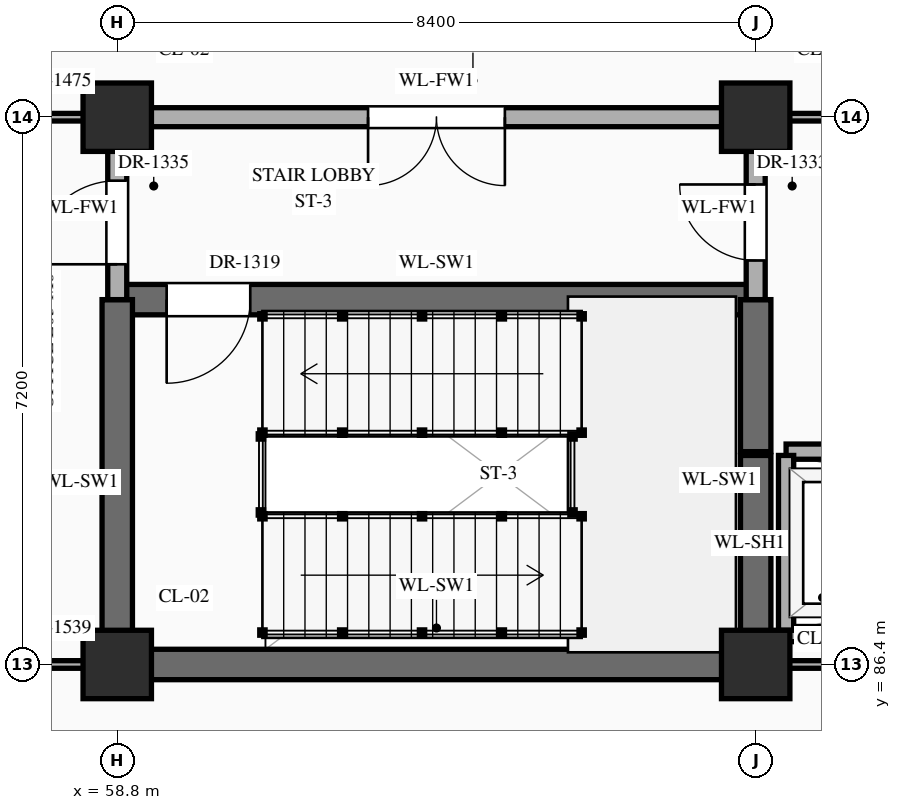
"""IFC4 building model, lengths in metres.
Left out: names, types, materials, properties, quantities, classifications, styles, units other than length and angle.
Written with IfcOpenShell. Run it as: python <this file> out.ifc"""

import sys

from ifc_helpers import new_model, si_unit, direction, frame, frame_2d, origin, origin_2d, place, context, subcontext, project, spatial, rectangle, extrude, element, fill, save


model = new_model("IFC4")
c1 = context("Model", 3, precision=1e-05, world=origin(), true_north=direction((0.0, 1.0)))
c2 = subcontext(c1, "Body", "Model", "MODEL_VIEW")
j1 = project(units=[si_unit("LENGTHUNIT", "METRE"), si_unit("PLANEANGLEUNIT", "RADIAN")], contexts=[c1])
p1 = place(None, origin())
s1 = spatial("IfcSite", under=j1, at=p1, CompositionType="ELEMENT")
p2 = place(p1, origin())
s2 = spatial("IfcBuilding", under=s1, at=p2, CompositionType="ELEMENT")
p3 = place(p2, frame((0.0, 0.0, 10.8)))
s3 = spatial("IfcBuildingStorey", under=s2, at=p3, CompositionType="ELEMENT", Elevation=10.8)
for number, where, z_axis, x_axis in (
    (1, (58.8, 86.4, 0.0), (0.0, 0.0, 1.0), (1.0, 0.0, 0.0)),
    (2, (58.8, 93.6, 0.0), (0.0, 0.0, 1.0), (1.0, 0.0, 0.0)),
    (3, (67.2, 86.4, 0.0), (0.0, 0.0, 1.0), (1.0, 0.0, 0.0)),
    (4, (67.2, 93.6, 0.0), (0.0, 0.0, 1.0), (1.0, 0.0, 0.0)),
):
    element("IfcColumn", number, at=place(p3, frame(where, z_axis=z_axis, x_axis=x_axis)), inside=s3, PredefinedType="COLUMN", context=c2, shape_type="SweptSolid", body=[
        extrude(rectangle(XDim=0.9, YDim=0.9, at=origin_2d()), origin(), (0.0, 0.0, 1.0), 5.4),
    ])
p4 = place(p3, frame((50.4, 86.4, 0.0), z_axis=(0.0, 0.0, 1.0), x_axis=(1.0, 0.0, 0.0)))
e5 = element("IfcWall", 5, at=p4, inside=s3, PredefinedType="STANDARD", context=c2, shape_type="SweptSolid", body=[
    extrude(rectangle(XDim=8.4, YDim=0.1, at=frame_2d((4.2, 0.0))), origin(), (0.0, 0.0, 1.0), 4.27),
])
p5 = place(p4, frame((0.985, 0.0, 0.0)))
e6 = element("IfcOpeningElement", 6, at=p5, cuts=e5, PredefinedType="OPENING", context=c2, shape_type="SweptSolid", body=[
    extrude(rectangle(XDim=1.2, YDim=2.35, at=frame_2d((0.6, 1.175))), frame((0.0, 0.062, 0.0), z_axis=(0.0, -1.0, 0.0), x_axis=(1.0, 0.0, 0.0)), (0.0, 0.0, 1.0), 0.124),
])
p6 = place(p4, frame((3.56, 0.0, 0.0)))
e7 = element("IfcOpeningElement", 7, at=p6, cuts=e5, PredefinedType="OPENING", context=c2, shape_type="SweptSolid", body=[
    extrude(rectangle(XDim=1.28, YDim=2.35, at=frame_2d((0.64, 1.175))), frame((0.0, 0.062, 0.0), z_axis=(0.0, -1.0, 0.0), x_axis=(1.0, 0.0, 0.0)), (0.0, 0.0, 1.0), 0.124),
])
p7 = place(p4, frame((6.345, 0.0, 0.0)))
e8 = element("IfcOpeningElement", 8, at=p7, cuts=e5, PredefinedType="OPENING", context=c2, shape_type="SweptSolid", body=[
    extrude(rectangle(XDim=0.94, YDim=2.3, at=frame_2d((0.47, 1.15))), frame((0.0, 0.062, 0.0), z_axis=(0.0, -1.0, 0.0), x_axis=(1.0, 0.0, 0.0)), (0.0, 0.0, 1.0), 0.124),
])
p8 = place(p3, frame((58.8, 86.4, 0.0), z_axis=(0.0, 0.0, 1.0), x_axis=(1.0, 0.0, 0.0)))
e9 = element("IfcWall", 9, at=p8, inside=s3, PredefinedType="SHEAR", context=c2, shape_type="SweptSolid", body=[
    extrude(rectangle(XDim=8.4, YDim=0.4, at=frame_2d((4.2, 0.0))), origin(), (0.0, 0.0, 1.0), 5.12),
])
p9 = place(p3, frame((67.25, 86.4, 0.0), z_axis=(0.0, 0.0, 1.0), x_axis=(1.0, 0.0, 0.0)))
e10 = element("IfcWall", 10, at=p9, inside=s3, PredefinedType="STANDARD", context=c2, shape_type="SweptSolid", body=[
    extrude(rectangle(XDim=8.3, YDim=0.1, at=frame_2d((4.15, 0.0))), origin(), (0.0, 0.0, 1.0), 4.27),
])
p10 = place(p3, frame((67.6, 86.8, 0.0), z_axis=(0.0, 0.0, 1.0), x_axis=(1.0, 0.0, 0.0)))
e11 = element("IfcWall", 11, at=p10, inside=s3, PredefinedType="STANDARD", context=c2, shape_type="SweptSolid", body=[
    extrude(rectangle(XDim=2.5, YDim=0.2, at=frame_2d((1.25, 0.0))), origin(), (0.0, 0.0, 1.0), 5.12),
])
p11 = place(p3, frame((67.6, 89.2, 0.0), z_axis=(0.0, 0.0, 1.0), x_axis=(1.0, 0.0, 0.0)))
e12 = element("IfcWall", 12, at=p11, inside=s3, PredefinedType="STANDARD", context=c2, shape_type="SweptSolid", body=[
    extrude(rectangle(XDim=7.7, YDim=0.2, at=frame_2d((3.85, 0.0))), origin(), (0.0, 0.0, 1.0), 5.12),
])
p12 = place(p11, frame((0.725, 0.0, 0.0)))
e13 = element("IfcOpeningElement", 13, at=p12, cuts=e12, PredefinedType="OPENING", context=c2, shape_type="SweptSolid", body=[
    extrude(rectangle(XDim=1.1, YDim=2.15, at=frame_2d((0.55, 1.075))), frame((0.0, 0.112, 0.0), z_axis=(0.0, -1.0, 0.0), x_axis=(1.0, 0.0, 0.0)), (0.0, 0.0, 1.0), 0.224),
])
p13 = place(p11, frame((3.3, 0.0, 0.0)))
e14 = element("IfcOpeningElement", 14, at=p13, cuts=e12, PredefinedType="OPENING", context=c2, shape_type="SweptSolid", body=[
    extrude(rectangle(XDim=1.1, YDim=2.15, at=frame_2d((0.55, 1.075))), frame((0.0, 0.112, 0.0), z_axis=(0.0, -1.0, 0.0), x_axis=(1.0, 0.0, 0.0)), (0.0, 0.0, 1.0), 0.224),
])
p14 = place(p11, frame((5.875, 0.0, 0.0)))
e15 = element("IfcOpeningElement", 15, at=p14, cuts=e12, PredefinedType="OPENING", context=c2, shape_type="SweptSolid", body=[
    extrude(rectangle(XDim=1.1, YDim=2.15, at=frame_2d((0.55, 1.075))), frame((0.0, 0.112, 0.0), z_axis=(0.0, -1.0, 0.0), x_axis=(1.0, 0.0, 0.0)), (0.0, 0.0, 1.0), 0.224),
])
p15 = place(p3, frame((58.8, 91.2, 0.0), z_axis=(0.0, 0.0, 1.0), x_axis=(1.0, 0.0, 0.0)))
e16 = element("IfcWall", 16, at=p15, inside=s3, PredefinedType="SHEAR", context=c2, shape_type="SweptSolid", body=[
    extrude(rectangle(XDim=8.4, YDim=0.4, at=frame_2d((4.2, 0.0))), origin(), (0.0, 0.0, 1.0), 5.12),
])
p16 = place(p15, frame((0.65, 0.0, 0.0)))
e17 = element("IfcOpeningElement", 17, at=p16, cuts=e16, PredefinedType="OPENING", context=c2, shape_type="SweptSolid", body=[
    extrude(rectangle(XDim=1.1, YDim=2.2, at=frame_2d((0.55, 1.1))), frame((0.0, 0.212, 0.0), z_axis=(0.0, -1.0, 0.0), x_axis=(1.0, 0.0, 0.0)), (0.0, 0.0, 1.0), 0.424),
])
p17 = place(p3, frame((50.4, 93.6, 0.0), z_axis=(0.0, 0.0, 1.0), x_axis=(1.0, 0.0, 0.0)))
e18 = element("IfcWall", 18, at=p17, inside=s3, PredefinedType="STANDARD", context=c2, shape_type="SweptSolid", body=[
    extrude(rectangle(XDim=8.4, YDim=0.1, at=frame_2d((4.2, 0.0))), origin(), (0.0, 0.0, 1.0), 4.27),
])
p18 = place(p17, frame((1.075, 0.0, 0.0)))
e19 = element("IfcOpeningElement", 19, at=p18, cuts=e18, PredefinedType="OPENING", context=c2, shape_type="SweptSolid", body=[
    extrude(rectangle(XDim=1.02, YDim=2.4, at=frame_2d((0.51, 1.2))), frame((0.0, 0.062, 0.0), z_axis=(0.0, -1.0, 0.0), x_axis=(1.0, 0.0, 0.0)), (0.0, 0.0, 1.0), 0.124),
])
p19 = place(p17, frame((3.67, 0.0, 0.0)))
e20 = element("IfcOpeningElement", 20, at=p19, cuts=e18, PredefinedType="OPENING", context=c2, shape_type="SweptSolid", body=[
    extrude(rectangle(XDim=1.06, YDim=2.4, at=frame_2d((0.53, 1.2))), frame((0.0, 0.062, 0.0), z_axis=(0.0, -1.0, 0.0), x_axis=(1.0, 0.0, 0.0)), (0.0, 0.0, 1.0), 0.124),
])
p20 = place(p17, frame((6.245, 0.0, 0.0)))
e21 = element("IfcOpeningElement", 21, at=p20, cuts=e18, PredefinedType="OPENING", context=c2, shape_type="SweptSolid", body=[
    extrude(rectangle(XDim=1.14, YDim=2.4, at=frame_2d((0.57, 1.2))), frame((0.0, 0.062, 0.0), z_axis=(0.0, -1.0, 0.0), x_axis=(1.0, 0.0, 0.0)), (0.0, 0.0, 1.0), 0.124),
])
p21 = place(p3, frame((58.8, 93.6, 0.0), z_axis=(0.0, 0.0, 1.0), x_axis=(1.0, 0.0, 0.0)))
e22 = element("IfcWall", 22, at=p21, inside=s3, PredefinedType="STANDARD", context=c2, shape_type="SweptSolid", body=[
    extrude(rectangle(XDim=8.4, YDim=0.25, at=frame_2d((4.2, 0.0))), origin(), (0.0, 0.0, 1.0), 4.27),
])
p22 = place(p21, frame((3.3, 0.0, 0.0)))
e23 = element("IfcOpeningElement", 23, at=p22, cuts=e22, PredefinedType="OPENING", context=c2, shape_type="SweptSolid", body=[
    extrude(rectangle(XDim=1.8, YDim=2.35, at=frame_2d((0.9, 1.175))), frame((0.0, 0.137, 0.0), z_axis=(0.0, -1.0, 0.0), x_axis=(1.0, 0.0, 0.0)), (0.0, 0.0, 1.0), 0.274),
])
p23 = place(p3, frame((67.2, 93.6, 0.0), z_axis=(0.0, 0.0, 1.0), x_axis=(1.0, 0.0, 0.0)))
e24 = element("IfcWall", 24, at=p23, inside=s3, PredefinedType="STANDARD", context=c2, shape_type="SweptSolid", body=[
    extrude(rectangle(XDim=33.6, YDim=0.1, at=frame_2d((16.8, 0.0))), origin(), (0.0, 0.0, 1.0), 4.27),
])
p24 = place(p23, frame((3.475, 0.0, 0.0)))
e25 = element("IfcOpeningElement", 25, at=p24, cuts=e24, PredefinedType="OPENING", context=c2, shape_type="SweptSolid", body=[
    extrude(rectangle(XDim=1.45, YDim=2.3, at=frame_2d((0.725, 1.15))), frame((0.0, 0.062, 0.0), z_axis=(0.0, -1.0, 0.0), x_axis=(1.0, 0.0, 0.0)), (0.0, 0.0, 1.0), 0.124),
])
p25 = place(p23, frame((28.45, 0.0, 0.0)))
e26 = element("IfcOpeningElement", 26, at=p25, cuts=e24, PredefinedType="OPENING", context=c2, shape_type="SweptSolid", body=[
    extrude(rectangle(XDim=1.9, YDim=2.5, at=frame_2d((0.95, 1.25))), frame((0.0, 0.062, 0.0), z_axis=(0.0, -1.0, 0.0), x_axis=(1.0, 0.0, 0.0)), (0.0, 0.0, 1.0), 0.124),
])
p26 = place(p23, frame((11.825, 0.0, 0.0)))
e27 = element("IfcOpeningElement", 27, at=p26, cuts=e24, PredefinedType="OPENING", context=c2, shape_type="SweptSolid", body=[
    extrude(rectangle(XDim=1.55, YDim=2.35, at=frame_2d((0.775, 1.175))), frame((0.0, 0.062, 0.0), z_axis=(0.0, -1.0, 0.0), x_axis=(1.0, 0.0, 0.0)), (0.0, 0.0, 1.0), 0.124),
])
p27 = place(p23, frame((17.785, 0.0, 0.0)))
e28 = element("IfcOpeningElement", 28, at=p27, cuts=e24, PredefinedType="OPENING", context=c2, shape_type="SweptSolid", body=[
    extrude(rectangle(XDim=1.2, YDim=2.35, at=frame_2d((0.6, 1.175))), frame((0.0, 0.062, 0.0), z_axis=(0.0, -1.0, 0.0), x_axis=(1.0, 0.0, 0.0)), (0.0, 0.0, 1.0), 0.124),
])
p28 = place(p23, frame((20.38, 0.0, 0.0)))
e29 = element("IfcOpeningElement", 29, at=p28, cuts=e24, PredefinedType="OPENING", context=c2, shape_type="SweptSolid", body=[
    extrude(rectangle(XDim=1.24, YDim=2.3, at=frame_2d((0.62, 1.15))), frame((0.0, 0.062, 0.0), z_axis=(0.0, -1.0, 0.0), x_axis=(1.0, 0.0, 0.0)), (0.0, 0.0, 1.0), 0.124),
])
p29 = place(p23, frame((22.975, 0.0, 0.0)))
e30 = element("IfcOpeningElement", 30, at=p29, cuts=e24, PredefinedType="OPENING", context=c2, shape_type="SweptSolid", body=[
    extrude(rectangle(XDim=1.28, YDim=2.35, at=frame_2d((0.64, 1.175))), frame((0.0, 0.062, 0.0), z_axis=(0.0, -1.0, 0.0), x_axis=(1.0, 0.0, 0.0)), (0.0, 0.0, 1.0), 0.124),
])
p30 = place(p3, frame((58.8, 86.4, 0.0), z_axis=(0.0, 0.0, 1.0), x_axis=(0.0, 1.0, 0.0)))
e31 = element("IfcWall", 31, at=p30, inside=s3, PredefinedType="SHEAR", context=c2, shape_type="SweptSolid", body=[
    extrude(rectangle(XDim=4.8, YDim=0.4, at=frame_2d((2.4, 0.0))), origin(), (0.0, 0.0, 1.0), 5.12),
])
p31 = place(p3, frame((58.8, 91.2, 0.0), z_axis=(0.0, 0.0, 1.0), x_axis=(0.0, 1.0, 0.0)))
e32 = element("IfcWall", 32, at=p31, inside=s3, PredefinedType="STANDARD", context=c2, shape_type="SweptSolid", body=[
    extrude(rectangle(XDim=2.4, YDim=0.25, at=frame_2d((1.2, 0.0))), origin(), (0.0, 0.0, 1.0), 4.37),
])
p32 = place(p31, frame((0.465, 0.0, 0.0)))
e33 = element("IfcOpeningElement", 33, at=p32, cuts=e32, PredefinedType="OPENING", context=c2, shape_type="SweptSolid", body=[
    extrude(rectangle(XDim=1.1, YDim=2.2, at=frame_2d((0.55, 1.1))), frame((0.0, 0.137, 0.0), z_axis=(0.0, -1.0, 0.0), x_axis=(1.0, 0.0, 0.0)), (0.0, 0.0, 1.0), 0.274),
])
p33 = place(p3, frame((67.2, 86.45, 0.0), z_axis=(0.0, 0.0, 1.0), x_axis=(0.0, 1.0, 0.0)))
e34 = element("IfcWall", 34, at=p33, inside=s3, PredefinedType="SHEAR", context=c2, shape_type="SweptSolid", body=[
    extrude(rectangle(XDim=2.7, YDim=0.4, at=frame_2d((1.35, 0.0))), origin(), (0.0, 0.0, 1.0), 5.12),
])
p34 = place(p3, frame((67.2, 89.2, 0.0), z_axis=(0.0, 0.0, 1.0), x_axis=(0.0, 1.0, 0.0)))
e35 = element("IfcWall", 35, at=p34, inside=s3, PredefinedType="SHEAR", context=c2, shape_type="SweptSolid", body=[
    extrude(rectangle(XDim=2.0, YDim=0.4, at=frame_2d((1.0, 0.0))), origin(), (0.0, 0.0, 1.0), 5.12),
])
p35 = place(p3, frame((67.2, 91.2, 0.0), z_axis=(0.0, 0.0, 1.0), x_axis=(0.0, 1.0, 0.0)))
e36 = element("IfcWall", 36, at=p35, inside=s3, PredefinedType="STANDARD", context=c2, shape_type="SweptSolid", body=[
    extrude(rectangle(XDim=2.4, YDim=0.25, at=frame_2d((1.2, 0.0))), origin(), (0.0, 0.0, 1.0), 4.37),
])
p36 = place(p35, frame((0.515, 0.0, 0.0)))
e37 = element("IfcOpeningElement", 37, at=p36, cuts=e36, PredefinedType="OPENING", context=c2, shape_type="SweptSolid", body=[
    extrude(rectangle(XDim=1.0, YDim=2.2, at=frame_2d((0.5, 1.1))), frame((0.0, 0.137, 0.0), z_axis=(0.0, -1.0, 0.0), x_axis=(1.0, 0.0, 0.0)), (0.0, 0.0, 1.0), 0.274),
])
p37 = place(p3, frame((67.6, 86.85, 0.0), z_axis=(0.0, 0.0, 1.0), x_axis=(0.0, 1.0, 0.0)))
e38 = element("IfcWall", 38, at=p37, inside=s3, PredefinedType="STANDARD", context=c2, shape_type="SweptSolid", body=[
    extrude(rectangle(XDim=2.3, YDim=0.2, at=frame_2d((1.15, 0.0))), origin(), (0.0, 0.0, 1.0), 5.12),
])
p38 = place(p16, frame((1.1, 0.0, 0.0), z_axis=(0.0, 0.0, 1.0), x_axis=(-1.0, 0.0, 0.0)))
e39 = element("IfcDoor", 39, at=p38, inside=s3, OperationType="SINGLE_SWING_RIGHT", PredefinedType="DOOR", context=c2, shape_type="SweptSolid", body=[
    extrude(rectangle(XDim=1.1, YDim=2.2, at=frame_2d((0.55, 1.1))), frame((0.0, 0.025, 0.0), z_axis=(0.0, -1.0, 0.0), x_axis=(1.0, 0.0, 0.0)), (0.0, 0.0, 1.0), 0.05),
])
fill(e17, e39)
p39 = place(p36, origin())
e40 = element("IfcDoor", 40, at=p39, inside=s3, OperationType="SINGLE_SWING_RIGHT", PredefinedType="DOOR", context=c2, shape_type="SweptSolid", body=[
    extrude(rectangle(XDim=1.0, YDim=2.2, at=frame_2d((0.5, 1.1))), frame((0.0, 0.025, 0.0), z_axis=(0.0, -1.0, 0.0), x_axis=(1.0, 0.0, 0.0)), (0.0, 0.0, 1.0), 0.05),
])
fill(e37, e40)
p40 = place(p22, frame((1.8, 0.0, 0.0), z_axis=(0.0, 0.0, 1.0), x_axis=(-1.0, 0.0, 0.0)))
e41 = element("IfcDoor", 41, at=p40, inside=s3, OperationType="DOUBLE_DOOR_SINGLE_SWING", PredefinedType="DOOR", context=c2, shape_type="SweptSolid", body=[
    extrude(rectangle(XDim=1.8, YDim=2.35, at=frame_2d((0.9, 1.175))), frame((0.0, 0.025, 0.0), z_axis=(0.0, -1.0, 0.0), x_axis=(1.0, 0.0, 0.0)), (0.0, 0.0, 1.0), 0.05),
])
fill(e23, e41)
p41 = place(p32, origin())
e42 = element("IfcDoor", 42, at=p41, inside=s3, OperationType="SINGLE_SWING_LEFT", PredefinedType="DOOR", context=c2, shape_type="SweptSolid", body=[
    extrude(rectangle(XDim=1.1, YDim=2.2, at=frame_2d((0.55, 1.1))), frame((0.0, 0.025, 0.0), z_axis=(0.0, -1.0, 0.0), x_axis=(1.0, 0.0, 0.0)), (0.0, 0.0, 1.0), 0.05),
])
fill(e33, e42)
save(model, sys.argv[1])
